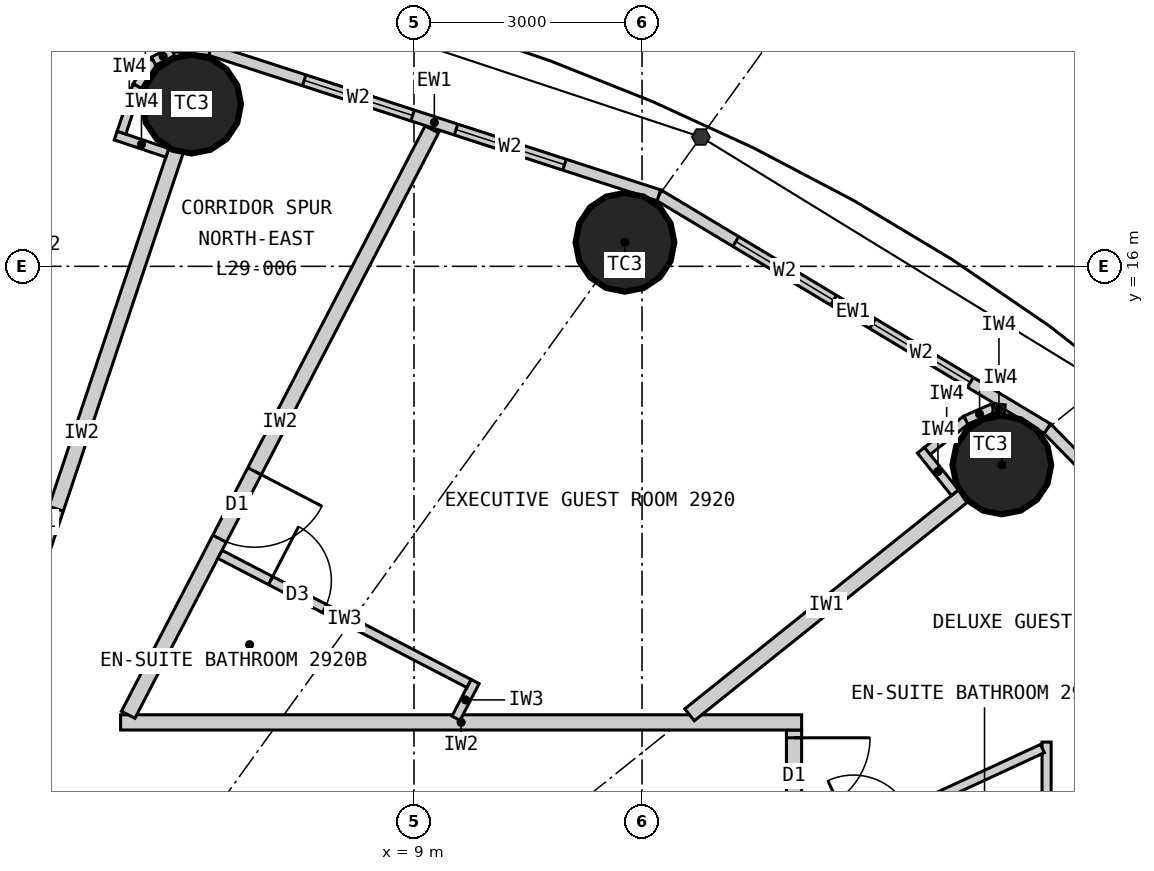
"""IFC4 building model, lengths in metres.
Left out: names, types, materials, properties, quantities, classifications, styles, units other than length and angle.
Written with IfcOpenShell. Run it as: python <this file> out.ifc"""

import sys

from ifc_helpers import new_model, si_unit, direction, frame, frame_2d, origin, origin_2d, place, context, subcontext, project, spatial, rectangle, circle, extrude, element, fill, save


model = new_model("IFC4")
c1 = context("Model", 3, precision=1e-05, world=origin(), true_north=direction((0.0, 1.0)))
c2 = subcontext(c1, "Body", "Model", "MODEL_VIEW")
j1 = project(units=[si_unit("LENGTHUNIT", "METRE"), si_unit("PLANEANGLEUNIT", "RADIAN")], contexts=[c1])
p1 = place(None, origin())
s1 = spatial("IfcSite", under=j1, at=p1, CompositionType="ELEMENT")
p2 = place(p1, origin())
s2 = spatial("IfcBuilding", under=s1, at=p2, CompositionType="ELEMENT")
p3 = place(p2, frame((0.0, 0.0, 115.5)))
s3 = spatial("IfcBuildingStorey", under=s2, at=p3, CompositionType="ELEMENT", Elevation=115.5)
for number, where, z_axis, x_axis in (
    (1, (16.734, 13.387, 0.0), (0.0, 0.0, 1.0), (1.0, 0.0, 0.0)),
    (2, (11.775, 16.316, 0.0), (0.0, 0.0, 1.0), (1.0, 0.0, 0.0)),
    (3, (6.074, 18.135, 0.0), (0.0, 0.0, 1.0), (1.0, 0.0, 0.0)),
):
    element("IfcColumn", number, at=place(p3, frame(where, z_axis=z_axis, x_axis=x_axis)), inside=s3, PredefinedType="COLUMN", context=c2, shape_type="SweptSolid", body=[
        extrude(circle(Radius=0.65, at=origin_2d()), origin(), (0.0, 0.0, 1.0), 3.3),
    ])
p4 = place(p3, frame((21.287, 9.832, 0.0), z_axis=(0.0, 0.0, 1.0), x_axis=(-0.700136650834, 0.714008872605, 0.0)))
e4 = element("IfcWall", 4, at=p4, inside=s3, PredefinedType="ELEMENTEDWALL", context=c2, shape_type="SweptSolid", body=[
    extrude(rectangle(XDim=5.649, YDim=0.15, at=frame_2d((2.825, 0.0))), origin(), (0.0, 0.0, 1.0), 3.12),
])
p5 = place(p4, frame((1.025, 0.0, 0.9)))
e5 = element("IfcOpeningElement", 5, at=p5, cuts=e4, PredefinedType="OPENING", context=c2, shape_type="SweptSolid", body=[
    extrude(rectangle(XDim=1.5, YDim=1.9, at=frame_2d((0.75, 0.95))), frame((0.0, 0.085, 0.0), z_axis=(0.0, -1.0, 0.0), x_axis=(1.0, 0.0, 0.0)), (0.0, 0.0, 1.0), 0.17),
])
p6 = place(p4, frame((3.125, 0.0, 0.9)))
e6 = element("IfcOpeningElement", 6, at=p6, cuts=e4, PredefinedType="OPENING", context=c2, shape_type="SweptSolid", body=[
    extrude(rectangle(XDim=1.5, YDim=1.9, at=frame_2d((0.75, 0.95))), frame((0.0, 0.085, 0.0), z_axis=(0.0, -1.0, 0.0), x_axis=(1.0, 0.0, 0.0)), (0.0, 0.0, 1.0), 0.17),
])
p7 = place(p3, frame((17.332, 13.866, 0.0), z_axis=(0.0, 0.0, 1.0), x_axis=(-0.857308573723, 0.514802884044, 0.0)))
e7 = element("IfcWall", 7, at=p7, inside=s3, PredefinedType="ELEMENTEDWALL", context=c2, shape_type="SweptSolid", body=[
    extrude(rectangle(XDim=5.961, YDim=0.15, at=frame_2d((2.98, 0.0))), origin(), (0.0, 0.0, 1.0), 3.12),
])
p8 = place(p7, frame((1.181, 0.0, 0.9)))
e8 = element("IfcOpeningElement", 8, at=p8, cuts=e7, PredefinedType="OPENING", context=c2, shape_type="SweptSolid", body=[
    extrude(rectangle(XDim=1.5, YDim=1.9, at=frame_2d((0.75, 0.95))), frame((0.0, 0.085, 0.0), z_axis=(0.0, -1.0, 0.0), x_axis=(1.0, 0.0, 0.0)), (0.0, 0.0, 1.0), 0.17),
])
p9 = place(p7, frame((3.281, 0.0, 0.9)))
e9 = element("IfcOpeningElement", 9, at=p9, cuts=e7, PredefinedType="OPENING", context=c2, shape_type="SweptSolid", body=[
    extrude(rectangle(XDim=1.5, YDim=1.9, at=frame_2d((0.75, 0.95))), frame((0.0, 0.085, 0.0), z_axis=(0.0, -1.0, 0.0), x_axis=(1.0, 0.0, 0.0)), (0.0, 0.0, 1.0), 0.17),
])
p10 = place(p3, frame((12.221, 16.935, 0.0), z_axis=(0.0, 0.0, 1.0), x_axis=(-0.951272691506, 0.308350881944, 0.0)))
e10 = element("IfcWall", 10, at=p10, inside=s3, PredefinedType="ELEMENTEDWALL", context=c2, shape_type="SweptSolid", body=[
    extrude(rectangle(XDim=6.211, YDim=0.15, at=frame_2d((3.105, 0.0))), origin(), (0.0, 0.0, 1.0), 3.12),
])
p11 = place(p10, frame((1.305, 0.0, 0.9)))
e11 = element("IfcOpeningElement", 11, at=p11, cuts=e10, PredefinedType="OPENING", context=c2, shape_type="SweptSolid", body=[
    extrude(rectangle(XDim=1.5, YDim=1.9, at=frame_2d((0.75, 0.95))), frame((0.0, 0.085, 0.0), z_axis=(0.0, -1.0, 0.0), x_axis=(1.0, 0.0, 0.0)), (0.0, 0.0, 1.0), 0.17),
])
p12 = place(p10, frame((3.405, 0.0, 0.9)))
e12 = element("IfcOpeningElement", 12, at=p12, cuts=e10, PredefinedType="OPENING", context=c2, shape_type="SweptSolid", body=[
    extrude(rectangle(XDim=1.5, YDim=1.9, at=frame_2d((0.75, 0.95))), frame((0.0, 0.085, 0.0), z_axis=(0.0, -1.0, 0.0), x_axis=(1.0, 0.0, 0.0)), (0.0, 0.0, 1.0), 0.17),
])
p13 = place(p3, frame((6.313, 18.85, 0.0), z_axis=(0.0, 0.0, 1.0), x_axis=(-0.994735690163, 0.102473931887, 0.0)))
e13 = element("IfcWall", 13, at=p13, inside=s3, PredefinedType="ELEMENTEDWALL", context=c2, shape_type="SweptSolid", body=[
    extrude(rectangle(XDim=6.347, YDim=0.15, at=frame_2d((3.173, 0.0))), origin(), (0.0, 0.0, 1.0), 3.12),
])
p14 = place(p13, frame((1.373, 0.0, 0.9)))
e14 = element("IfcOpeningElement", 14, at=p14, cuts=e13, PredefinedType="OPENING", context=c2, shape_type="SweptSolid", body=[
    extrude(rectangle(XDim=1.5, YDim=1.9, at=frame_2d((0.75, 0.95))), frame((0.0, 0.085, 0.0), z_axis=(0.0, -1.0, 0.0), x_axis=(1.0, 0.0, 0.0)), (0.0, 0.0, 1.0), 0.17),
])
p15 = place(p13, frame((3.473, 0.0, 0.9)))
e15 = element("IfcOpeningElement", 15, at=p15, cuts=e13, PredefinedType="OPENING", context=c2, shape_type="SweptSolid", body=[
    extrude(rectangle(XDim=1.5, YDim=1.9, at=frame_2d((0.75, 0.95))), frame((0.0, 0.085, 0.0), z_axis=(0.0, -1.0, 0.0), x_axis=(1.0, 0.0, 0.0)), (0.0, 0.0, 1.0), 0.17),
])
p16 = place(p3, frame((14.0, -9.9, 0.0), z_axis=(0.0, 0.0, 1.0), x_axis=(0.0, 1.0, 0.0)))
e16 = element("IfcWall", 16, at=p16, inside=s3, PredefinedType="PARTITIONING", context=c2, shape_type="SweptSolid", body=[
    extrude(rectangle(XDim=19.8, YDim=0.2, at=frame_2d((9.9, 0.0))), origin(), (0.0, 0.0, 1.0), 3.12),
])
p17 = place(p16, frame((3.318, 0.0, 0.0)))
e17 = element("IfcOpeningElement", 17, at=p17, cuts=e16, PredefinedType="OPENING", context=c2, shape_type="SweptSolid", body=[
    extrude(rectangle(XDim=1.0, YDim=2.2, at=frame_2d((0.5, 1.1))), frame((0.0, 0.11, 0.0), z_axis=(0.0, -1.0, 0.0), x_axis=(1.0, 0.0, 0.0)), (0.0, 0.0, 1.0), 0.22),
])
p18 = place(p16, frame((9.238, 0.0, 0.0)))
e18 = element("IfcOpeningElement", 18, at=p18, cuts=e16, PredefinedType="OPENING", context=c2, shape_type="SweptSolid", body=[
    extrude(rectangle(XDim=1.0, YDim=2.2, at=frame_2d((0.5, 1.1))), frame((0.0, 0.11, 0.0), z_axis=(0.0, -1.0, 0.0), x_axis=(1.0, 0.0, 0.0)), (0.0, 0.0, 1.0), 0.22),
])
p19 = place(p16, frame((13.742, 0.0, 0.0)))
e19 = element("IfcOpeningElement", 19, at=p19, cuts=e16, PredefinedType="OPENING", context=c2, shape_type="SweptSolid", body=[
    extrude(rectangle(XDim=1.0, YDim=2.2, at=frame_2d((0.5, 1.1))), frame((0.0, 0.11, 0.0), z_axis=(0.0, -1.0, 0.0), x_axis=(1.0, 0.0, 0.0)), (0.0, 0.0, 1.0), 0.22),
])
p20 = place(p16, frame((18.698, 0.0, 0.0)))
e20 = element("IfcOpeningElement", 20, at=p20, cuts=e16, PredefinedType="OPENING", context=c2, shape_type="SweptSolid", body=[
    extrude(rectangle(XDim=1.0, YDim=2.2, at=frame_2d((0.5, 1.1))), frame((0.0, 0.11, 0.0), z_axis=(0.0, -1.0, 0.0), x_axis=(1.0, 0.0, 0.0)), (0.0, 0.0, 1.0), 0.22),
])
p21 = place(p3, frame((5.139, 10.0, 0.0), z_axis=(0.0, 0.0, 1.0), x_axis=(1.0, 0.0, 0.0)))
e21 = element("IfcWall", 21, at=p21, inside=s3, PredefinedType="PARTITIONING", context=c2, shape_type="SweptSolid", body=[
    extrude(rectangle(XDim=8.961, YDim=0.2, at=frame_2d((4.48, 0.0))), origin(), (0.0, 0.0, 1.0), 3.12),
])
p22 = place(p3, frame((14.1, 6.512, 0.0), z_axis=(0.0, 0.0, 1.0), x_axis=(0.907833019998, 0.419331858797, 0.0)))
e22 = element("IfcWall", 22, at=p22, inside=s3, PredefinedType="PARTITIONING", context=c2, shape_type="SweptSolid", body=[
    extrude(rectangle(XDim=6.505, YDim=0.2, at=frame_2d((3.252, 0.0))), origin(), (0.0, 0.0, 1.0), 2.27),
])
p23 = place(p3, frame((12.625, 10.1, 0.0), z_axis=(0.0, 0.0, 1.0), x_axis=(0.780863644897, 0.624701503182, 0.0)))
e23 = element("IfcWall", 23, at=p23, inside=s3, PredefinedType="PARTITIONING", context=c2, shape_type="SweptSolid", body=[
    extrude(rectangle(XDim=4.612, YDim=0.2, at=frame_2d((2.306, 0.0))), origin(), (0.0, 0.0, 1.0), 2.37),
])
p24 = place(p3, frame((5.239, 10.1, 0.0), z_axis=(0.0, 0.0, 1.0), x_axis=(0.4604797896, 0.887670188398, 0.0)))
e24 = element("IfcWall", 24, at=p24, inside=s3, PredefinedType="PARTITIONING", context=c2, shape_type="SweptSolid", body=[
    extrude(rectangle(XDim=8.676, YDim=0.2, at=frame_2d((4.338, 0.0))), origin(), (0.0, 0.0, 1.0), 3.12),
])
p25 = place(p24, frame((2.61, 0.0, 0.0)))
e25 = element("IfcOpeningElement", 25, at=p25, cuts=e24, PredefinedType="OPENING", context=c2, shape_type="SweptSolid", body=[
    extrude(rectangle(XDim=1.0, YDim=2.2, at=frame_2d((0.5, 1.1))), frame((0.0, 0.11, 0.0), z_axis=(0.0, -1.0, 0.0), x_axis=(1.0, 0.0, 0.0)), (0.0, 0.0, 1.0), 0.22),
])
p26 = place(p3, frame((3.383, 10.1, 0.0), z_axis=(0.0, 0.0, 1.0), x_axis=(0.317603705574, 0.948223542318, 0.0)))
e26 = element("IfcWall", 26, at=p26, inside=s3, PredefinedType="PARTITIONING", context=c2, shape_type="SweptSolid", body=[
    extrude(rectangle(XDim=7.823, YDim=0.2, at=frame_2d((3.912, 0.0))), origin(), (0.0, 0.0, 1.0), 2.37),
])
p27 = place(p26, frame((1.86, 0.0, 0.0)))
e27 = element("IfcOpeningElement", 27, at=p27, cuts=e26, PredefinedType="OPENING", context=c2, shape_type="SweptSolid", body=[
    extrude(rectangle(XDim=1.0, YDim=2.2, at=frame_2d((0.5, 1.1))), frame((0.0, 0.11, 0.0), z_axis=(0.0, -1.0, 0.0), x_axis=(1.0, 0.0, 0.0)), (0.0, 0.0, 1.0), 0.22),
])
p28 = place(p3, frame((17.323, 8.101, 0.0), z_axis=(0.0, 0.0, 1.0), x_axis=(0.0, 1.0, 0.0)))
e28 = element("IfcWall", 28, at=p28, inside=s3, PredefinedType="PARTITIONING", context=c2, shape_type="SweptSolid", body=[
    extrude(rectangle(XDim=1.64, YDim=0.12, at=frame_2d((0.82, 0.0))), origin(), (0.0, 0.0, 1.0), 3.12),
])
p29 = place(p3, frame((14.1, 8.193, 0.0), z_axis=(0.0, 0.0, 1.0), x_axis=(0.907836493557, 0.419324338628, 0.0)))
e29 = element("IfcWall", 29, at=p29, inside=s3, PredefinedType="PARTITIONING", context=c2, shape_type="SweptSolid", body=[
    extrude(rectangle(XDim=3.49, YDim=0.12, at=frame_2d((1.745, 0.0))), origin(), (0.0, 0.0, 1.0), 3.12),
])
p30 = place(p29, frame((0.75, 0.0, 0.0)))
e30 = element("IfcOpeningElement", 30, at=p30, cuts=e29, PredefinedType="OPENING", context=c2, shape_type="SweptSolid", body=[
    extrude(rectangle(XDim=0.8, YDim=2.1, at=frame_2d((0.4, 1.05))), frame((0.0, 0.07, 0.0), z_axis=(0.0, -1.0, 0.0), x_axis=(1.0, 0.0, 0.0)), (0.0, 0.0, 1.0), 0.14),
])
p31 = place(p3, frame((9.552, 10.054, 0.0), z_axis=(0.0, 0.0, 1.0), x_axis=(0.460604866949, 0.887605293215, 0.0)))
e31 = element("IfcWall", 31, at=p31, inside=s3, PredefinedType="PARTITIONING", context=c2, shape_type="SweptSolid", body=[
    extrude(rectangle(XDim=0.545, YDim=0.12, at=frame_2d((0.272, 0.0))), origin(), (0.0, 0.0, 1.0), 3.12),
])
p32 = place(p3, frame((6.447, 12.211, 0.0), z_axis=(0.0, 0.0, 1.0), x_axis=(0.887685422499, -0.460450421525, 0.0)))
e32 = element("IfcWall", 32, at=p32, inside=s3, PredefinedType="PARTITIONING", context=c2, shape_type="SweptSolid", body=[
    extrude(rectangle(XDim=3.69, YDim=0.12, at=frame_2d((1.845, 0.0))), origin(), (0.0, 0.0, 1.0), 3.12),
])
p33 = place(p32, frame((0.75, 0.0, 0.0)))
e33 = element("IfcOpeningElement", 33, at=p33, cuts=e32, PredefinedType="OPENING", context=c2, shape_type="SweptSolid", body=[
    extrude(rectangle(XDim=0.8, YDim=2.1, at=frame_2d((0.4, 1.05))), frame((0.0, 0.07, 0.0), z_axis=(0.0, -1.0, 0.0), x_axis=(1.0, 0.0, 0.0)), (0.0, 0.0, 1.0), 0.14),
])
p34 = place(p3, frame((16.117, 13.022, 0.0), z_axis=(0.0, 0.0, 1.0), x_axis=(-0.62465344249, 0.780902091677, 0.0)))
e34 = element("IfcWall", 34, at=p34, inside=s3, PredefinedType="PARTITIONING", context=c2, shape_type="SweptSolid", body=[
    extrude(rectangle(XDim=0.716, YDim=0.12, at=frame_2d((0.358, 0.0))), origin(), (0.0, 0.0, 1.0), 3.12),
])
p35 = place(p3, frame((15.754, 13.571, 0.0), z_axis=(0.0, 0.0, 1.0), x_axis=(0.780905453553, 0.624649239663, 0.0)))
e35 = element("IfcWall", 35, at=p35, inside=s3, PredefinedType="PARTITIONING", context=c2, shape_type="SweptSolid", body=[
    extrude(rectangle(XDim=0.65, YDim=0.12, at=frame_2d((0.325, 0.0))), origin(), (0.0, 0.0, 1.0), 3.12),
])
p36 = place(p3, frame((16.262, 13.977, 0.0), z_axis=(0.0, 0.0, 1.0), x_axis=(0.915985403703, 0.401211590314, 0.0)))
e36 = element("IfcWall", 36, at=p36, inside=s3, PredefinedType="PARTITIONING", context=c2, shape_type="SweptSolid", body=[
    extrude(rectangle(XDim=0.391, YDim=0.12, at=frame_2d((0.196, 0.0))), origin(), (0.0, 0.0, 1.0), 3.12),
])
p37 = place(p3, frame((16.62, 14.134, 0.0), z_axis=(0.0, 0.0, 1.0), x_axis=(0.993941871493, -0.109907033867, 0.0)))
e37 = element("IfcWall", 37, at=p37, inside=s3, PredefinedType="PARTITIONING", context=c2, shape_type="SweptSolid", body=[
    extrude(rectangle(XDim=0.153, YDim=0.12, at=frame_2d((0.077, 0.0))), origin(), (0.0, 0.0, 1.0), 3.12),
])
p38 = place(p3, frame((5.754, 17.493, 0.0), z_axis=(0.0, 0.0, 1.0), x_axis=(-0.9482389443, 0.317557718397, 0.0)))
e38 = element("IfcWall", 38, at=p38, inside=s3, PredefinedType="PARTITIONING", context=c2, shape_type="SweptSolid", body=[
    extrude(rectangle(XDim=0.716, YDim=0.12, at=frame_2d((0.358, 0.0))), origin(), (0.0, 0.0, 1.0), 3.12),
])
p39 = place(p3, frame((5.151, 17.758, 0.0), z_axis=(0.0, 0.0, 1.0), x_axis=(0.317354244456, 0.948307061835, 0.0)))
e39 = element("IfcWall", 39, at=p39, inside=s3, PredefinedType="PARTITIONING", context=c2, shape_type="SweptSolid", body=[
    extrude(rectangle(XDim=0.65, YDim=0.12, at=frame_2d((0.325, 0.0))), origin(), (0.0, 0.0, 1.0), 3.12),
])
p40 = place(p3, frame((5.357, 18.375, 0.0), z_axis=(0.0, 0.0, 1.0), x_axis=(0.552249752128, 0.833678721856, 0.0)))
e40 = element("IfcWall", 40, at=p40, inside=s3, PredefinedType="PARTITIONING", context=c2, shape_type="SweptSolid", body=[
    extrude(rectangle(XDim=0.391, YDim=0.12, at=frame_2d((0.196, 0.0))), origin(), (0.0, 0.0, 1.0), 3.12),
])
p41 = place(p3, frame((5.573, 18.701, 0.0), z_axis=(0.0, 0.0, 1.0), x_axis=(0.895295561985, 0.445472621707, 0.0)))
e41 = element("IfcWall", 41, at=p41, inside=s3, PredefinedType="PARTITIONING", context=c2, shape_type="SweptSolid", body=[
    extrude(rectangle(XDim=0.281, YDim=0.12, at=frame_2d((0.14, 0.0))), origin(), (0.0, 0.0, 1.0), 3.12),
])
p42 = place(p8, origin())
e42 = element("IfcWindow", 42, at=p42, inside=s3, PartitioningType="SINGLE_PANEL", PredefinedType="WINDOW", context=c2, shape_type="SweptSolid", body=[
    extrude(rectangle(XDim=1.5, YDim=1.9, at=frame_2d((0.75, 0.95))), frame((0.0, 0.03, 0.0), z_axis=(0.0, -1.0, 0.0), x_axis=(1.0, 0.0, 0.0)), (0.0, 0.0, 1.0), 0.06),
])
fill(e8, e42)
p43 = place(p9, origin())
e43 = element("IfcWindow", 43, at=p43, inside=s3, PartitioningType="SINGLE_PANEL", PredefinedType="WINDOW", context=c2, shape_type="SweptSolid", body=[
    extrude(rectangle(XDim=1.5, YDim=1.9, at=frame_2d((0.75, 0.95))), frame((0.0, 0.03, 0.0), z_axis=(0.0, -1.0, 0.0), x_axis=(1.0, 0.0, 0.0)), (0.0, 0.0, 1.0), 0.06),
])
fill(e9, e43)
p44 = place(p11, origin())
e44 = element("IfcWindow", 44, at=p44, inside=s3, PartitioningType="SINGLE_PANEL", PredefinedType="WINDOW", context=c2, shape_type="SweptSolid", body=[
    extrude(rectangle(XDim=1.5, YDim=1.9, at=frame_2d((0.75, 0.95))), frame((0.0, 0.03, 0.0), z_axis=(0.0, -1.0, 0.0), x_axis=(1.0, 0.0, 0.0)), (0.0, 0.0, 1.0), 0.06),
])
fill(e11, e44)
p45 = place(p12, origin())
e45 = element("IfcWindow", 45, at=p45, inside=s3, PartitioningType="SINGLE_PANEL", PredefinedType="WINDOW", context=c2, shape_type="SweptSolid", body=[
    extrude(rectangle(XDim=1.5, YDim=1.9, at=frame_2d((0.75, 0.95))), frame((0.0, 0.03, 0.0), z_axis=(0.0, -1.0, 0.0), x_axis=(1.0, 0.0, 0.0)), (0.0, 0.0, 1.0), 0.06),
])
fill(e12, e45)
p46 = place(p27, origin())
e46 = element("IfcDoor", 46, at=p46, inside=s3, OperationType="SINGLE_SWING_LEFT", PredefinedType="DOOR", context=c2, shape_type="SweptSolid", body=[
    extrude(rectangle(XDim=1.0, YDim=2.2, at=frame_2d((0.5, 1.1))), frame((0.0, 0.025, 0.0), z_axis=(0.0, -1.0, 0.0), x_axis=(1.0, 0.0, 0.0)), (0.0, 0.0, 1.0), 0.05),
])
fill(e27, e46)
p47 = place(p20, origin())
e47 = element("IfcDoor", 47, at=p47, inside=s3, OperationType="SINGLE_SWING_RIGHT", PredefinedType="DOOR", context=c2, shape_type="SweptSolid", body=[
    extrude(rectangle(XDim=1.0, YDim=2.2, at=frame_2d((0.5, 1.1))), frame((0.0, 0.025, 0.0), z_axis=(0.0, -1.0, 0.0), x_axis=(1.0, 0.0, 0.0)), (0.0, 0.0, 1.0), 0.05),
])
fill(e20, e47)
p48 = place(p33, origin())
e48 = element("IfcDoor", 48, at=p48, inside=s3, OperationType="SINGLE_SWING_LEFT", PredefinedType="DOOR", context=c2, shape_type="SweptSolid", body=[
    extrude(rectangle(XDim=0.8, YDim=2.1, at=frame_2d((0.4, 1.05))), frame((0.0, 0.025, 0.0), z_axis=(0.0, -1.0, 0.0), x_axis=(1.0, 0.0, 0.0)), (0.0, 0.0, 1.0), 0.05),
])
fill(e33, e48)
p49 = place(p25, origin())
e49 = element("IfcDoor", 49, at=p49, inside=s3, OperationType="SINGLE_SWING_RIGHT", PredefinedType="DOOR", context=c2, shape_type="SweptSolid", body=[
    extrude(rectangle(XDim=1.0, YDim=2.2, at=frame_2d((0.5, 1.1))), frame((0.0, 0.025, 0.0), z_axis=(0.0, -1.0, 0.0), x_axis=(1.0, 0.0, 0.0)), (0.0, 0.0, 1.0), 0.05),
])
fill(e25, e49)
save(model, sys.argv[1])
